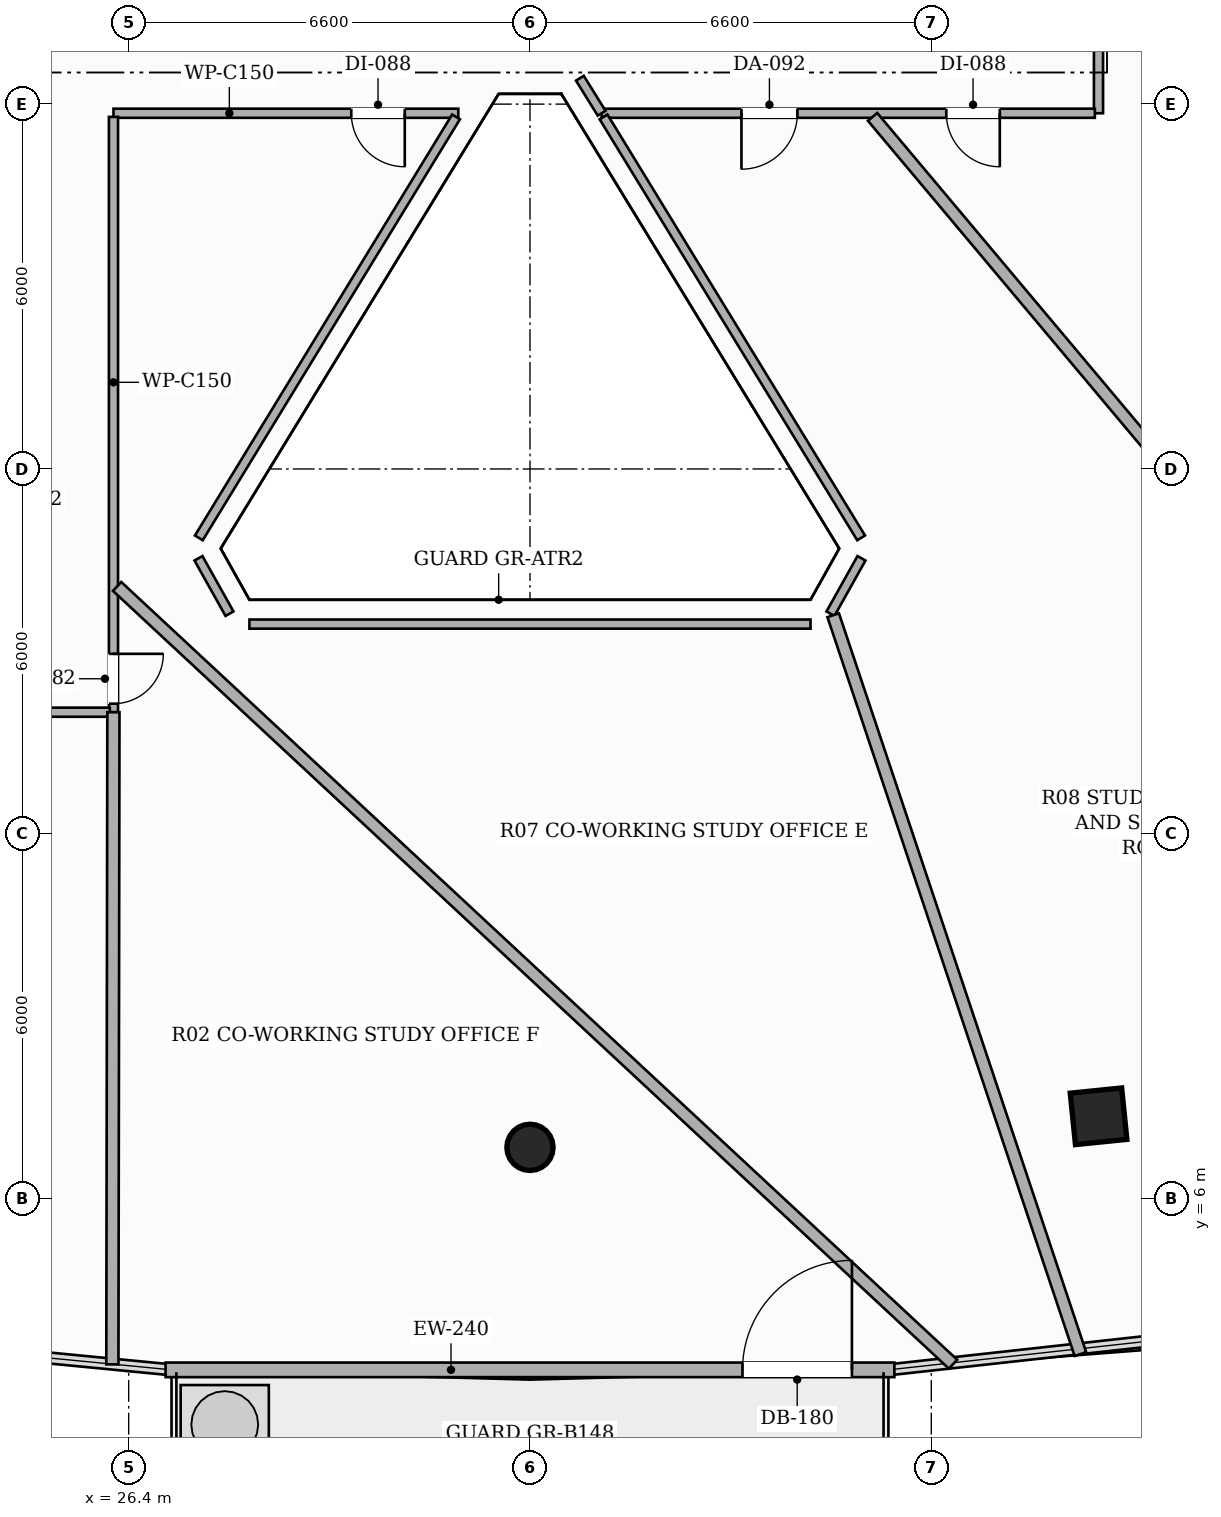
"""IFC4 building model, lengths in metres.
Left out: names, types, materials, properties, quantities, classifications, styles, units other than length and angle.
Written with IfcOpenShell. Run it as: python <this file> out.ifc"""

import sys

from ifc_helpers import new_model, si_unit, direction, frame, frame_2d, origin, origin_2d, place, context, subcontext, project, spatial, rectangle, hollow_rectangle, hollow_circle, extrude, element, fill, save


model = new_model("IFC4")
c1 = context("Model", 3, precision=1e-05, world=origin(), true_north=direction((0.0, 1.0)))
c2 = subcontext(c1, "Body", "Model", "MODEL_VIEW")
j1 = project(units=[si_unit("LENGTHUNIT", "METRE"), si_unit("PLANEANGLEUNIT", "RADIAN")], contexts=[c1])
p1 = place(None, origin())
s1 = spatial("IfcSite", under=j1, at=p1, CompositionType="ELEMENT")
p2 = place(p1, origin())
s2 = spatial("IfcBuilding", under=s1, at=p2, CompositionType="ELEMENT")
p3 = place(p2, frame((0.0, 0.0, 129.8)))
s3 = spatial("IfcBuildingStorey", under=s2, at=p3, CompositionType="ELEMENT", Elevation=129.8)
p4 = place(p3, frame((33.0, 6.844, 0.0), z_axis=(0.0, 0.0, 1.0), x_axis=(1.0, 0.0, 0.0)))
e1 = element("IfcColumn", 1, at=p4, inside=s3, PredefinedType="COLUMN", context=c2, shape_type="SweptSolid", body=[
    extrude(hollow_circle(Radius=0.381, WallThickness=0.022, at=origin_2d()), origin(), (0.0, 0.0, 1.0), 3.3),
])
p5 = place(p3, frame((42.351, 7.355, 0.0), z_axis=(0.0, 0.0, 1.0), x_axis=(0.994880708829, 0.101056297183, 0.0)))
e2 = element("IfcColumn", 2, at=p5, inside=s3, PredefinedType="COLUMN", context=c2, shape_type="SweptSolid", body=[
    extrude(hollow_rectangle(XDim=0.85, YDim=0.85, WallThickness=0.028, at=origin_2d()), origin(), (0.0, 0.0, 1.0), 3.3),
])
p6 = place(p3, frame((27.007, 3.185, 0.0), z_axis=(0.0, 0.0, 1.0), x_axis=(1.0, 0.0, 0.0)))
e3 = element("IfcWall", 3, at=p6, inside=s3, PredefinedType="SOLIDWALL", context=c2, shape_type="SweptSolid", body=[
    extrude(rectangle(XDim=11.986, YDim=0.24, at=frame_2d((5.993, 0.0))), origin(), (0.0, 0.0, 1.0), 2.624),
])
p7 = place(p6, frame((9.488, 0.0, 0.0)))
e4 = element("IfcOpeningElement", 4, at=p7, cuts=e3, PredefinedType="OPENING", context=c2, shape_type="SweptSolid", body=[
    extrude(rectangle(XDim=1.8, YDim=2.2, at=frame_2d((0.9, 1.1))), frame((0.0, 0.13, 0.0), z_axis=(0.0, -1.0, 0.0), x_axis=(1.0, 0.0, 0.0)), (0.0, 0.0, 1.0), 0.26),
])
p8 = place(p3, frame((31.821, 23.85, 0.0), z_axis=(0.0, 0.0, 1.0), x_axis=(-1.0, 0.0, 0.0)))
e5 = element("IfcWall", 5, at=p8, inside=s3, PredefinedType="PARTITIONING", context=c2, shape_type="SweptSolid", body=[
    extrude(rectangle(XDim=5.671, YDim=0.15, at=frame_2d((2.835, 0.0))), origin(), (0.0, 0.0, 1.0), 2.721),
])
p9 = place(p8, frame((0.88, 0.0, 0.0)))
e6 = element("IfcOpeningElement", 6, at=p9, cuts=e5, PredefinedType="OPENING", context=c2, shape_type="SweptSolid", body=[
    extrude(rectangle(XDim=0.88, YDim=2.1, at=frame_2d((0.44, 1.05))), frame((0.0, 0.085, 0.0), z_axis=(0.0, -1.0, 0.0), x_axis=(1.0, 0.0, 0.0)), (0.0, 0.0, 1.0), 0.17),
])
p10 = place(p3, frame((26.15, 23.79, 0.0), z_axis=(0.0, 0.0, 1.0), x_axis=(0.0, -1.0, 0.0)))
e7 = element("IfcWall", 7, at=p10, inside=s3, PredefinedType="PARTITIONING", context=c2, shape_type="SweptSolid", body=[
    extrude(rectangle(XDim=9.79, YDim=0.15, at=frame_2d((4.895, 0.0))), origin(), (0.0, 0.0, 1.0), 2.721),
])
p11 = place(p10, frame((8.83, 0.0, 0.0)))
e8 = element("IfcOpeningElement", 8, at=p11, cuts=e7, PredefinedType="OPENING", context=c2, shape_type="SweptSolid", body=[
    extrude(rectangle(XDim=0.82, YDim=2.1, at=frame_2d((0.41, 1.05))), frame((0.0, 0.085, 0.0), z_axis=(0.0, -1.0, 0.0), x_axis=(1.0, 0.0, 0.0)), (0.0, 0.0, 1.0), 0.17),
])
p12 = place(p3, frame((26.09, 14.0, 0.0), z_axis=(0.0, 0.0, 1.0), x_axis=(-1.0, 0.0, 0.0)))
e9 = element("IfcWall", 9, at=p12, inside=s3, PredefinedType="PARTITIONING", context=c2, shape_type="SweptSolid", body=[
    extrude(rectangle(XDim=2.59, YDim=0.15, at=frame_2d((1.295, 0.0))), origin(), (0.0, 0.0, 1.0), 2.721),
])
p13 = place(p3, frame((42.35, 28.34, 0.0), z_axis=(0.0, 0.0, 1.0), x_axis=(0.0, -1.0, 0.0)))
e10 = element("IfcWall", 10, at=p13, inside=s3, PredefinedType="PARTITIONING", context=c2, shape_type="SweptSolid", body=[
    extrude(rectangle(XDim=4.49, YDim=0.15, at=frame_2d((2.245, 0.0))), origin(), (0.0, 0.0, 1.0), 2.721),
])
p14 = place(p13, frame((1.13, 0.0, 0.0)))
e11 = element("IfcOpeningElement", 11, at=p14, cuts=e10, PredefinedType="OPENING", context=c2, shape_type="SweptSolid", body=[
    extrude(rectangle(XDim=0.88, YDim=2.1, at=frame_2d((0.44, 1.05))), frame((0.0, 0.085, 0.0), z_axis=(0.0, -1.0, 0.0), x_axis=(1.0, 0.0, 0.0)), (0.0, 0.0, 1.0), 0.17),
])
p15 = place(p3, frame((42.29, 23.85, 0.0), z_axis=(0.0, 0.0, 1.0), x_axis=(-1.0, 0.0, 0.0)))
e12 = element("IfcWall", 12, at=p15, inside=s3, PredefinedType="PARTITIONING", context=c2, shape_type="SweptSolid", body=[
    extrude(rectangle(XDim=8.111, YDim=0.15, at=frame_2d((4.056, 0.0))), origin(), (0.0, 0.0, 1.0), 2.492),
])
p16 = place(p15, frame((1.563, 0.0, 0.0)))
e13 = element("IfcOpeningElement", 13, at=p16, cuts=e12, PredefinedType="OPENING", context=c2, shape_type="SweptSolid", body=[
    extrude(rectangle(XDim=0.88, YDim=2.1, at=frame_2d((0.44, 1.05))), frame((0.0, 0.085, 0.0), z_axis=(0.0, -1.0, 0.0), x_axis=(1.0, 0.0, 0.0)), (0.0, 0.0, 1.0), 0.17),
])
p17 = place(p15, frame((4.892, 0.0, 0.0)))
e14 = element("IfcOpeningElement", 14, at=p17, cuts=e12, PredefinedType="OPENING", context=c2, shape_type="SweptSolid", body=[
    extrude(rectangle(XDim=0.92, YDim=2.15, at=frame_2d((0.46, 1.075))), frame((0.0, 0.085, 0.0), z_axis=(0.0, -1.0, 0.0), x_axis=(1.0, 0.0, 0.0)), (0.0, 0.0, 1.0), 0.17),
])
p18 = place(p3, frame((34.179, 23.85, 0.0), z_axis=(0.0, 0.0, 1.0), x_axis=(-0.527828834635, 0.849350764601, 0.0)))
e15 = element("IfcWall", 15, at=p18, inside=s3, PredefinedType="PARTITIONING", context=c2, shape_type="SweptSolid", body=[
    extrude(rectangle(XDim=0.678, YDim=0.15, at=frame_2d((0.339, 0.0))), origin(), (0.0, 0.0, 1.0), 3.06),
])
p19 = place(p3, frame((34.21, 23.79, 0.0), z_axis=(0.0, 0.0, 1.0), x_axis=(0.521925672495, -0.852990968528, 0.0)))
e16 = element("IfcWall", 16, at=p19, inside=s3, PredefinedType="PARTITIONING", context=c2, shape_type="SweptSolid", body=[
    extrude(rectangle(XDim=8.116, YDim=0.15, at=frame_2d((4.058, 0.0))), origin(), (0.0, 0.0, 1.0), 2.721),
])
p20 = place(p3, frame((38.452, 16.531, 0.0), z_axis=(0.0, 0.0, 1.0), x_axis=(-0.488539276118, -0.872541904833, 0.0)))
e17 = element("IfcWall", 17, at=p20, inside=s3, PredefinedType="PARTITIONING", context=c2, shape_type="SweptSolid", body=[
    extrude(rectangle(XDim=1.044, YDim=0.15, at=frame_2d((0.522, 0.0))), origin(), (0.0, 0.0, 1.0), 3.06),
])
p21 = place(p3, frame((37.614, 15.449, 0.0), z_axis=(0.0, 0.0, 1.0), x_axis=(-1.0, 0.0, 0.0)))
e18 = element("IfcWall", 18, at=p21, inside=s3, PredefinedType="PARTITIONING", context=c2, shape_type="SweptSolid", body=[
    extrude(rectangle(XDim=9.228, YDim=0.15, at=frame_2d((4.614, 0.0))), origin(), (0.0, 0.0, 1.0), 2.721),
])
p22 = place(p3, frame((28.058, 15.62, 0.0), z_axis=(0.0, 0.0, 1.0), x_axis=(-0.488539276118, 0.872541904833, 0.0)))
e19 = element("IfcWall", 19, at=p22, inside=s3, PredefinedType="PARTITIONING", context=c2, shape_type="SweptSolid", body=[
    extrude(rectangle(XDim=1.044, YDim=0.15, at=frame_2d((0.522, 0.0))), origin(), (0.0, 0.0, 1.0), 3.06),
])
p23 = place(p3, frame((27.554, 16.867, 0.0), z_axis=(0.0, 0.0, 1.0), x_axis=(0.521378191963, 0.853325717968, 0.0)))
e20 = element("IfcWall", 20, at=p23, inside=s3, PredefinedType="PARTITIONING", context=c2, shape_type="SweptSolid", body=[
    extrude(rectangle(XDim=8.113, YDim=0.15, at=frame_2d((4.057, 0.0))), origin(), (0.0, 0.0, 1.0), 2.721),
])
p24 = place(p3, frame((54.526, 4.867, 0.0), z_axis=(0.0, 0.0, 1.0), x_axis=(-0.643084567011, 0.765795168222, 0.0)))
e21 = element("IfcWall", 21, at=p24, inside=s3, PredefinedType="PARTITIONING", context=c2, shape_type="SweptSolid", body=[
    extrude(rectangle(XDim=24.71, YDim=0.2, at=frame_2d((12.355, 0.0))), origin(), (0.0, 0.0, 1.0), 2.413),
])
p25 = place(p3, frame((42.41, 25.497, 0.0), z_axis=(0.0, 0.0, 1.0), x_axis=(0.882944726502, -0.46947695358, 0.0)))
e22 = element("IfcWall", 22, at=p25, inside=s3, PredefinedType="PARTITIONING", context=c2, shape_type="SweptSolid", body=[
    extrude(rectangle(XDim=13.426, YDim=0.2, at=frame_2d((6.713, 0.0))), origin(), (0.0, 0.0, 1.0), 2.413),
])
p26 = place(p3, frame((42.053, 3.444, 0.0), z_axis=(0.0, 0.0, 1.0), x_axis=(-0.317325063931, 0.948316826699, 0.0)))
e23 = element("IfcWall", 23, at=p26, inside=s3, PredefinedType="PARTITIONING", context=c2, shape_type="SweptSolid", body=[
    extrude(rectangle(XDim=12.813, YDim=0.2, at=frame_2d((6.406, 0.0))), origin(), (0.0, 0.0, 1.0), 2.413),
])
p27 = place(p3, frame((26.149, 14.0, 0.0), z_axis=(0.0, 0.0, 1.0), x_axis=(-0.001570678691, -0.999998766483, 0.0)))
e24 = element("IfcWall", 24, at=p27, inside=s3, PredefinedType="PARTITIONING", context=c2, shape_type="SweptSolid", body=[
    extrude(rectangle(XDim=10.725, YDim=0.2, at=frame_2d((5.363, 0.0))), origin(), (0.0, 0.0, 1.0), 2.413),
])
p28 = place(p3, frame((39.958, 3.278, 0.0), z_axis=(0.0, 0.0, 1.0), x_axis=(-0.732155976475, 0.681137009795, 0.0)))
e25 = element("IfcWall", 25, at=p28, inside=s3, PredefinedType="PARTITIONING", context=c2, shape_type="SweptSolid", body=[
    extrude(rectangle(XDim=18.778, YDim=0.2, at=frame_2d((9.389, 0.0))), origin(), (0.0, 0.0, 1.0), 2.413),
])
p29 = place(p7, origin())
e26 = element("IfcDoor", 26, at=p29, inside=s3, OperationType="SINGLE_SWING_RIGHT", PredefinedType="DOOR", context=c2, shape_type="SweptSolid", body=[
    extrude(rectangle(XDim=1.8, YDim=2.2, at=frame_2d((0.9, 1.1))), frame((0.0, 0.025, 0.0), z_axis=(0.0, -1.0, 0.0), x_axis=(1.0, 0.0, 0.0)), (0.0, 0.0, 1.0), 0.05),
])
fill(e4, e26)
p30 = place(p16, origin())
e27 = element("IfcDoor", 27, at=p30, inside=s3, OperationType="SINGLE_SWING_LEFT", PredefinedType="DOOR", context=c2, shape_type="SweptSolid", body=[
    extrude(rectangle(XDim=0.88, YDim=2.1, at=frame_2d((0.44, 1.05))), frame((0.0, 0.025, 0.0), z_axis=(0.0, -1.0, 0.0), x_axis=(1.0, 0.0, 0.0)), (0.0, 0.0, 1.0), 0.05),
])
fill(e13, e27)
p31 = place(p17, origin())
e28 = element("IfcDoor", 28, at=p31, inside=s3, OperationType="SINGLE_SWING_RIGHT", PredefinedType="DOOR", context=c2, shape_type="SweptSolid", body=[
    extrude(rectangle(XDim=0.92, YDim=2.15, at=frame_2d((0.46, 1.075))), frame((0.0, 0.025, 0.0), z_axis=(0.0, -1.0, 0.0), x_axis=(1.0, 0.0, 0.0)), (0.0, 0.0, 1.0), 0.05),
])
fill(e14, e28)
p32 = place(p9, origin())
e29 = element("IfcDoor", 29, at=p32, inside=s3, OperationType="SINGLE_SWING_LEFT", PredefinedType="DOOR", context=c2, shape_type="SweptSolid", body=[
    extrude(rectangle(XDim=0.88, YDim=2.1, at=frame_2d((0.44, 1.05))), frame((0.0, 0.025, 0.0), z_axis=(0.0, -1.0, 0.0), x_axis=(1.0, 0.0, 0.0)), (0.0, 0.0, 1.0), 0.05),
])
fill(e6, e29)
p33 = place(p11, origin())
e30 = element("IfcDoor", 30, at=p33, inside=s3, OperationType="SINGLE_SWING_LEFT", PredefinedType="DOOR", context=c2, shape_type="SweptSolid", body=[
    extrude(rectangle(XDim=0.82, YDim=2.1, at=frame_2d((0.41, 1.05))), frame((0.0, 0.025, 0.0), z_axis=(0.0, -1.0, 0.0), x_axis=(1.0, 0.0, 0.0)), (0.0, 0.0, 1.0), 0.05),
])
fill(e8, e30)
save(model, sys.argv[1])
